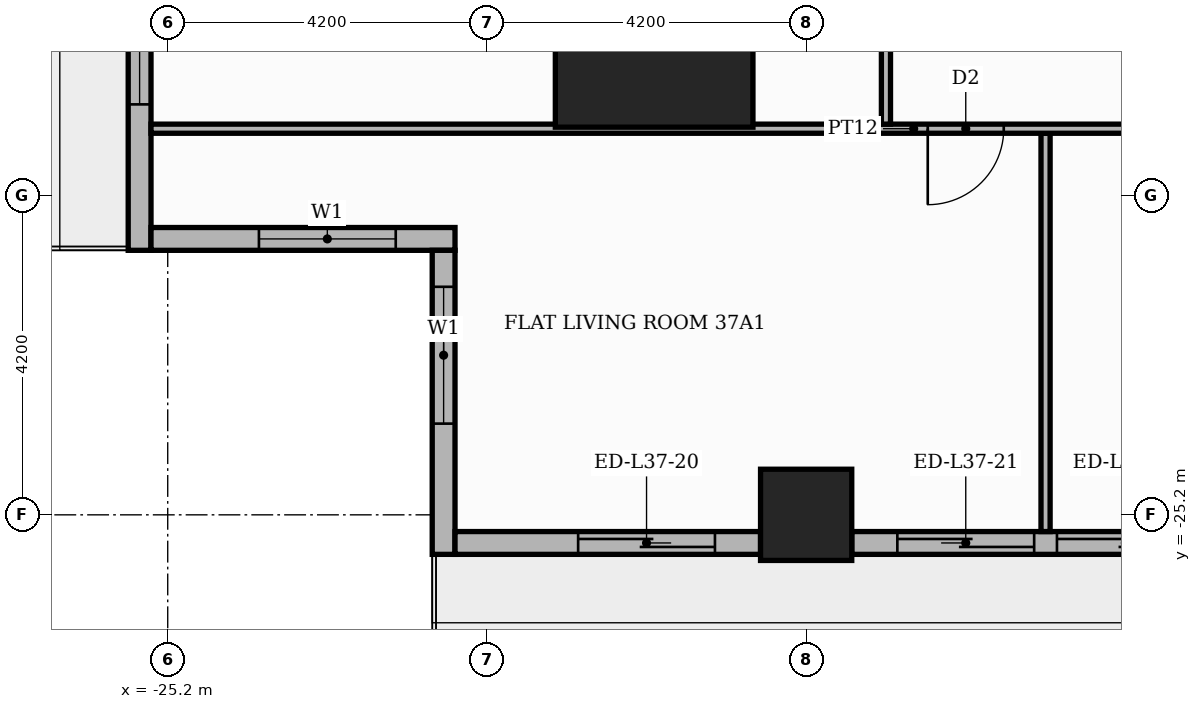
"""IFC4 building model, lengths in metres.
Left out: names, types, materials, properties, quantities, classifications, styles, units other than length and angle.
Written with IfcOpenShell. Run it as: python <this file> out.ifc"""

import sys

from ifc_helpers import new_model, si_unit, direction, frame, frame_2d, origin, origin_2d, place, context, subcontext, project, spatial, rectangle, extrude, element, fill, save


model = new_model("IFC4")
c1 = context("Model", 3, precision=1e-05, world=origin(), true_north=direction((0.0, 1.0)))
c2 = subcontext(c1, "Body", "Model", "MODEL_VIEW")
j1 = project(units=[si_unit("LENGTHUNIT", "METRE"), si_unit("PLANEANGLEUNIT", "RADIAN")], contexts=[c1])
p1 = place(None, origin())
s1 = spatial("IfcSite", under=j1, at=p1, CompositionType="ELEMENT")
p2 = place(p1, origin())
s2 = spatial("IfcBuilding", under=s1, at=p2, CompositionType="ELEMENT")
p3 = place(p2, frame((0.0, 0.0, 157.2)))
s3 = spatial("IfcBuildingStorey", under=s2, at=p3, CompositionType="ELEMENT", Elevation=157.2)
p4 = place(p3, frame((-18.8, -18.8, 0.0), z_axis=(0.0, 0.0, 1.0), x_axis=(1.0, 0.0, 0.0)))
e1 = element("IfcColumn", 1, at=p4, inside=s3, PredefinedType="COLUMN", context=c2, shape_type="SweptSolid", body=[
    extrude(rectangle(XDim=2.6, YDim=2.6, at=origin_2d()), origin(), (0.0, 0.0, 1.0), 3.9),
])
p5 = place(p3, frame((-16.8, -25.2, 0.0), z_axis=(0.0, 0.0, 1.0), x_axis=(1.0, 0.0, 0.0)))
e2 = element("IfcColumn", 2, at=p5, inside=s3, PredefinedType="COLUMN", context=c2, shape_type="SweptSolid", body=[
    extrude(rectangle(XDim=1.2, YDim=1.2, at=origin_2d()), origin(), (0.0, 0.0, 1.0), 3.9),
])
p6 = place(p3, frame((-25.57, -17.4, 0.0), z_axis=(0.0, 0.0, 1.0), x_axis=(0.0, -1.0, 0.0)))
e3 = element("IfcWall", 3, at=p6, inside=s3, PredefinedType="STANDARD", context=c2, shape_type="SweptSolid", body=[
    extrude(rectangle(XDim=4.32, YDim=0.3, at=frame_2d((2.16, 0.0))), origin(), (0.0, 0.0, 1.0), 3.48),
])
p7 = place(p6, frame((0.6, 0.0, 0.9)))
e4 = element("IfcOpeningElement", 4, at=p7, cuts=e3, PredefinedType="OPENING", context=c2, shape_type="SweptSolid", body=[
    extrude(rectangle(XDim=1.8, YDim=2.1, at=frame_2d((0.9, 1.05))), frame((0.0, 0.16, 0.0), z_axis=(0.0, -1.0, 0.0), x_axis=(1.0, 0.0, 0.0)), (0.0, 0.0, 1.0), 0.32),
])
p8 = place(p3, frame((-25.42, -21.57, 0.0), z_axis=(0.0, 0.0, 1.0), x_axis=(1.0, 0.0, 0.0)))
e5 = element("IfcWall", 5, at=p8, inside=s3, PredefinedType="STANDARD", context=c2, shape_type="SweptSolid", body=[
    extrude(rectangle(XDim=4.0, YDim=0.3, at=frame_2d((2.0, 0.0))), origin(), (0.0, 0.0, 1.0), 3.48),
])
p9 = place(p8, frame((1.42, 0.0, 0.9)))
e6 = element("IfcOpeningElement", 6, at=p9, cuts=e5, PredefinedType="OPENING", context=c2, shape_type="SweptSolid", body=[
    extrude(rectangle(XDim=1.8, YDim=2.1, at=frame_2d((0.9, 1.05))), frame((0.0, 0.16, 0.0), z_axis=(0.0, -1.0, 0.0), x_axis=(1.0, 0.0, 0.0)), (0.0, 0.0, 1.0), 0.32),
])
p10 = place(p3, frame((-21.57, -21.72, 0.0), z_axis=(0.0, 0.0, 1.0), x_axis=(0.0, -1.0, 0.0)))
e7 = element("IfcWall", 7, at=p10, inside=s3, PredefinedType="STANDARD", context=c2, shape_type="SweptSolid", body=[
    extrude(rectangle(XDim=4.0, YDim=0.3, at=frame_2d((2.0, 0.0))), origin(), (0.0, 0.0, 1.0), 3.48),
])
p11 = place(p10, frame((0.48, 0.0, 0.9)))
e8 = element("IfcOpeningElement", 8, at=p11, cuts=e7, PredefinedType="OPENING", context=c2, shape_type="SweptSolid", body=[
    extrude(rectangle(XDim=1.8, YDim=2.1, at=frame_2d((0.9, 1.05))), frame((0.0, 0.16, 0.0), z_axis=(0.0, -1.0, 0.0), x_axis=(1.0, 0.0, 0.0)), (0.0, 0.0, 1.0), 0.32),
])
p12 = place(p3, frame((-21.42, -25.57, 0.0), z_axis=(0.0, 0.0, 1.0), x_axis=(1.0, 0.0, 0.0)))
e9 = element("IfcWall", 9, at=p12, inside=s3, PredefinedType="STANDARD", context=c2, shape_type="SweptSolid", body=[
    extrude(rectangle(XDim=4.02, YDim=0.3, at=frame_2d((2.01, 0.0))), origin(), (0.0, 0.0, 1.0), 3.48),
])
p13 = place(p12, frame((1.62, 0.0, 0.0)))
e10 = element("IfcOpeningElement", 10, at=p13, cuts=e9, PredefinedType="OPENING", context=c2, shape_type="SweptSolid", body=[
    extrude(rectangle(XDim=1.8, YDim=2.4, at=frame_2d((0.9, 1.2))), frame((0.0, 0.16, 0.0), z_axis=(0.0, -1.0, 0.0), x_axis=(1.0, 0.0, 0.0)), (0.0, 0.0, 1.0), 0.32),
])
p14 = place(p3, frame((-16.2, -25.57, 0.0), z_axis=(0.0, 0.0, 1.0), x_axis=(1.0, 0.0, 0.0)))
e11 = element("IfcWall", 11, at=p14, inside=s3, PredefinedType="STANDARD", context=c2, shape_type="SweptSolid", body=[
    extrude(rectangle(XDim=7.2, YDim=0.3, at=frame_2d((3.6, 0.0))), origin(), (0.0, 0.0, 1.0), 3.48),
])
p15 = place(p14, frame((0.6, 0.0, 0.0)))
e12 = element("IfcOpeningElement", 12, at=p15, cuts=e11, PredefinedType="OPENING", context=c2, shape_type="SweptSolid", body=[
    extrude(rectangle(XDim=1.8, YDim=2.4, at=frame_2d((0.9, 1.2))), frame((0.0, 0.16, 0.0), z_axis=(0.0, -1.0, 0.0), x_axis=(1.0, 0.0, 0.0)), (0.0, 0.0, 1.0), 0.32),
])
p16 = place(p14, frame((2.7, 0.0, 0.0)))
e13 = element("IfcOpeningElement", 13, at=p16, cuts=e11, PredefinedType="OPENING", context=c2, shape_type="SweptSolid", body=[
    extrude(rectangle(XDim=1.8, YDim=2.4, at=frame_2d((0.9, 1.2))), frame((0.0, 0.16, 0.0), z_axis=(0.0, -1.0, 0.0), x_axis=(1.0, 0.0, 0.0)), (0.0, 0.0, 1.0), 0.32),
])
p17 = place(p14, frame((4.8, 0.0, 0.9)))
e14 = element("IfcOpeningElement", 14, at=p17, cuts=e11, PredefinedType="OPENING", context=c2, shape_type="SweptSolid", body=[
    extrude(rectangle(XDim=1.8, YDim=2.1, at=frame_2d((0.9, 1.05))), frame((0.0, 0.16, 0.0), z_axis=(0.0, -1.0, 0.0), x_axis=(1.0, 0.0, 0.0)), (0.0, 0.0, 1.0), 0.32),
])
p18 = place(p3, frame((-13.65, -25.42, 0.0), z_axis=(0.0, 0.0, 1.0), x_axis=(0.0, 1.0, 0.0)))
e15 = element("IfcWall", 15, at=p18, inside=s3, PredefinedType="PARTITIONING", context=c2, shape_type="SweptSolid", body=[
    extrude(rectangle(XDim=5.24, YDim=0.12, at=frame_2d((2.62, 0.0))), origin(), (0.0, 0.0, 1.0), 3.48),
])
p19 = place(p3, frame((-25.42, -20.12, 0.0), z_axis=(0.0, 0.0, 1.0), x_axis=(1.0, 0.0, 0.0)))
e16 = element("IfcWall", 16, at=p19, inside=s3, PredefinedType="PARTITIONING", context=c2, shape_type="SweptSolid", body=[
    extrude(rectangle(XDim=20.07, YDim=0.12, at=frame_2d((10.035, 0.0))), origin(), (0.0, 0.0, 1.0), 3.48),
])
p20 = place(p19, frame((10.22, 0.0, 0.0)))
e17 = element("IfcOpeningElement", 17, at=p20, cuts=e16, PredefinedType="OPENING", context=c2, shape_type="SweptSolid", body=[
    extrude(rectangle(XDim=1.0, YDim=2.1, at=frame_2d((0.5, 1.05))), frame((0.0, 0.07, 0.0), z_axis=(0.0, -1.0, 0.0), x_axis=(1.0, 0.0, 0.0)), (0.0, 0.0, 1.0), 0.14),
])
p21 = place(p19, frame((13.42, 0.0, 0.0)))
e18 = element("IfcOpeningElement", 18, at=p21, cuts=e16, PredefinedType="OPENING", context=c2, shape_type="SweptSolid", body=[
    extrude(rectangle(XDim=0.9, YDim=2.1, at=frame_2d((0.45, 1.05))), frame((0.0, 0.07, 0.0), z_axis=(0.0, -1.0, 0.0), x_axis=(1.0, 0.0, 0.0)), (0.0, 0.0, 1.0), 0.14),
])
p22 = place(p3, frame((-15.75, -20.06, 0.0), z_axis=(0.0, 0.0, 1.0), x_axis=(0.0, 1.0, 0.0)))
e19 = element("IfcWall", 19, at=p22, inside=s3, PredefinedType="PARTITIONING", context=c2, shape_type="SweptSolid", body=[
    extrude(rectangle(XDim=6.31, YDim=0.12, at=frame_2d((3.155, 0.0))), origin(), (0.0, 0.0, 1.0), 3.48),
])
p23 = place(p22, frame((2.675, 0.0, 0.0)))
e20 = element("IfcOpeningElement", 20, at=p23, cuts=e19, PredefinedType="OPENING", context=c2, shape_type="SweptSolid", body=[
    extrude(rectangle(XDim=1.0, YDim=2.1, at=frame_2d((0.5, 1.05))), frame((0.0, 0.07, 0.0), z_axis=(0.0, -1.0, 0.0), x_axis=(1.0, 0.0, 0.0)), (0.0, 0.0, 1.0), 0.14),
])
p24 = place(p7, origin())
e21 = element("IfcWindow", 21, at=p24, inside=s3, PartitioningType="SINGLE_PANEL", PredefinedType="WINDOW", context=c2, shape_type="SweptSolid", body=[
    extrude(rectangle(XDim=1.8, YDim=2.1, at=frame_2d((0.9, 1.05))), frame((0.0, 0.03, 0.0), z_axis=(0.0, -1.0, 0.0), x_axis=(1.0, 0.0, 0.0)), (0.0, 0.0, 1.0), 0.06),
])
fill(e4, e21)
p25 = place(p9, origin())
e22 = element("IfcWindow", 22, at=p25, inside=s3, PartitioningType="SINGLE_PANEL", PredefinedType="WINDOW", context=c2, shape_type="SweptSolid", body=[
    extrude(rectangle(XDim=1.8, YDim=2.1, at=frame_2d((0.9, 1.05))), frame((0.0, 0.03, 0.0), z_axis=(0.0, -1.0, 0.0), x_axis=(1.0, 0.0, 0.0)), (0.0, 0.0, 1.0), 0.06),
])
fill(e6, e22)
p26 = place(p11, origin())
e23 = element("IfcWindow", 23, at=p26, inside=s3, PartitioningType="SINGLE_PANEL", PredefinedType="WINDOW", context=c2, shape_type="SweptSolid", body=[
    extrude(rectangle(XDim=1.8, YDim=2.1, at=frame_2d((0.9, 1.05))), frame((0.0, 0.03, 0.0), z_axis=(0.0, -1.0, 0.0), x_axis=(1.0, 0.0, 0.0)), (0.0, 0.0, 1.0), 0.06),
])
fill(e8, e23)
p27 = place(p13, origin())
e24 = element("IfcDoor", 24, at=p27, inside=s3, OperationType="SLIDING_TO_RIGHT", PredefinedType="DOOR", context=c2, shape_type="SweptSolid", body=[
    extrude(rectangle(XDim=1.8, YDim=2.4, at=frame_2d((0.9, 1.2))), frame((0.0, 0.025, 0.0), z_axis=(0.0, -1.0, 0.0), x_axis=(1.0, 0.0, 0.0)), (0.0, 0.0, 1.0), 0.05),
])
fill(e10, e24)
p28 = place(p15, origin())
e25 = element("IfcDoor", 25, at=p28, inside=s3, OperationType="SLIDING_TO_LEFT", PredefinedType="DOOR", context=c2, shape_type="SweptSolid", body=[
    extrude(rectangle(XDim=1.8, YDim=2.4, at=frame_2d((0.9, 1.2))), frame((0.0, 0.025, 0.0), z_axis=(0.0, -1.0, 0.0), x_axis=(1.0, 0.0, 0.0)), (0.0, 0.0, 1.0), 0.05),
])
fill(e12, e25)
p29 = place(p16, origin())
e26 = element("IfcDoor", 26, at=p29, inside=s3, OperationType="SLIDING_TO_RIGHT", PredefinedType="DOOR", context=c2, shape_type="SweptSolid", body=[
    extrude(rectangle(XDim=1.8, YDim=2.4, at=frame_2d((0.9, 1.2))), frame((0.0, 0.025, 0.0), z_axis=(0.0, -1.0, 0.0), x_axis=(1.0, 0.0, 0.0)), (0.0, 0.0, 1.0), 0.05),
])
fill(e13, e26)
p30 = place(p20, frame((1.0, 0.0, 0.0), z_axis=(0.0, 0.0, 1.0), x_axis=(-1.0, 0.0, 0.0)))
e27 = element("IfcDoor", 27, at=p30, inside=s3, OperationType="SINGLE_SWING_LEFT", PredefinedType="DOOR", context=c2, shape_type="SweptSolid", body=[
    extrude(rectangle(XDim=1.0, YDim=2.1, at=frame_2d((0.5, 1.05))), frame((0.0, 0.025, 0.0), z_axis=(0.0, -1.0, 0.0), x_axis=(1.0, 0.0, 0.0)), (0.0, 0.0, 1.0), 0.05),
])
fill(e17, e27)
save(model, sys.argv[1])
